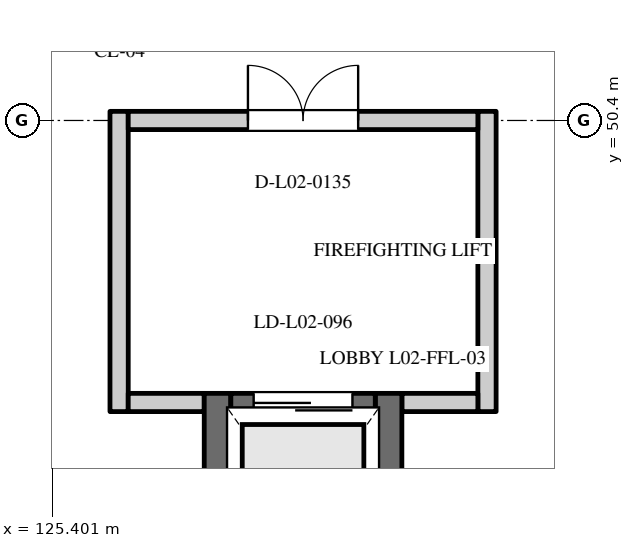
"""IFC4 building model, lengths in metres.
Left out: names, types, materials, properties, quantities, classifications, styles, units other than length and angle.
Written with IfcOpenShell. Run it as: python <this file> out.ifc"""

import sys

from ifc_helpers import new_model, si_unit, direction, frame, frame_2d, origin, place, context, subcontext, project, spatial, rectangle, extrude, element, fill, save


model = new_model("IFC4")
c1 = context("Model", 3, precision=1e-05, world=origin(), true_north=direction((0.0, 1.0)))
c2 = subcontext(c1, "Body", "Model", "MODEL_VIEW")
j1 = project(units=[si_unit("LENGTHUNIT", "METRE"), si_unit("PLANEANGLEUNIT", "RADIAN")], contexts=[c1])
p1 = place(None, origin())
s1 = spatial("IfcSite", under=j1, at=p1, CompositionType="ELEMENT")
p2 = place(p1, origin())
s2 = spatial("IfcBuilding", under=s1, at=p2, CompositionType="ELEMENT")
p3 = place(p2, frame((0.0, 0.0, 9.6)))
s3 = spatial("IfcBuildingStorey", under=s2, at=p3, CompositionType="ELEMENT", Elevation=9.6)
for number, where, z_axis, x_axis in (
    (1, (127.575, 43.06, 0.0), (0.0, 0.0, 1.0), (0.0, 1.0, 0.0)),
    (2, (129.825, 43.06, 0.0), (0.0, 0.0, 1.0), (0.0, 1.0, 0.0)),
):
    element("IfcWall", number, at=place(p3, frame(where, z_axis=z_axis, x_axis=x_axis)), inside=s3, PredefinedType="SHEAR", context=c2, shape_type="SweptSolid", body=[
        extrude(rectangle(XDim=3.75, YDim=0.35, at=frame_2d((1.875, 0.0))), origin(), (0.0, 0.0, 1.0), 4.8),
    ])
p4 = place(p3, frame((127.75, 46.635, 0.0), z_axis=(0.0, 0.0, 1.0), x_axis=(1.0, 0.0, 0.0)))
e3 = element("IfcWall", 3, at=p4, inside=s3, PredefinedType="SHEAR", context=c2, shape_type="SweptSolid", body=[
    extrude(rectangle(XDim=1.9, YDim=0.35, at=frame_2d((0.95, 0.0))), origin(), (0.0, 0.0, 1.0), 4.5),
])
p5 = place(p4, frame((0.3, 0.0, 0.0)))
e4 = element("IfcOpeningElement", 4, at=p5, cuts=e3, PredefinedType="OPENING", context=c2, shape_type="SweptSolid", body=[
    extrude(rectangle(XDim=1.3, YDim=2.2, at=frame_2d((0.65, 1.1))), frame((0.0, 0.187, 0.0), z_axis=(0.0, -1.0, 0.0), x_axis=(1.0, 0.0, 0.0)), (0.0, 0.0, 1.0), 0.374),
])
for number, where, z_axis, x_axis in (
    (5, (126.28, 46.57, 0.0), (0.0, 0.0, 1.0), (0.0, 1.0, 0.0)),
    (6, (131.12, 46.57, 0.0), (0.0, 0.0, 1.0), (0.0, 1.0, 0.0)),
):
    element("IfcWall", number, at=place(p3, frame(where, z_axis=z_axis, x_axis=x_axis)), inside=s3, PredefinedType="STANDARD", context=c2, shape_type="SweptSolid", body=[
        extrude(rectangle(XDim=3.95, YDim=0.24, at=frame_2d((1.975, 0.0))), origin(), (0.0, 0.0, 1.0), 3.75),
    ])
for number, where, z_axis, x_axis in (
    (7, (126.4, 46.69, 0.0), (0.0, 0.0, 1.0), (1.0, 0.0, 0.0)),
    (8, (130.0, 46.69, 0.0), (0.0, 0.0, 1.0), (1.0, 0.0, 0.0)),
):
    element("IfcWall", number, at=place(p3, frame(where, z_axis=z_axis, x_axis=x_axis)), inside=s3, PredefinedType="STANDARD", context=c2, shape_type="SweptSolid", body=[
        extrude(rectangle(XDim=1.0, YDim=0.24, at=frame_2d((0.5, 0.0))), origin(), (0.0, 0.0, 1.0), 3.75),
    ])
p6 = place(p3, frame((126.4, 50.4, 0.0), z_axis=(0.0, 0.0, 1.0), x_axis=(1.0, 0.0, 0.0)))
e9 = element("IfcWall", 9, at=p6, inside=s3, PredefinedType="STANDARD", context=c2, shape_type="SweptSolid", body=[
    extrude(rectangle(XDim=4.6, YDim=0.24, at=frame_2d((2.3, 0.0))), origin(), (0.0, 0.0, 1.0), 3.75),
])
p7 = place(p6, frame((1.575, 0.0, 0.0)))
e10 = element("IfcOpeningElement", 10, at=p7, cuts=e9, PredefinedType="OPENING", context=c2, shape_type="SweptSolid", body=[
    extrude(rectangle(XDim=1.45, YDim=2.2, at=frame_2d((0.725, 1.1))), frame((0.0, 0.132, 0.0), z_axis=(0.0, -1.0, 0.0), x_axis=(1.0, 0.0, 0.0)), (0.0, 0.0, 1.0), 0.264),
])
p8 = place(p5, origin())
e11 = element("IfcDoor", 11, at=p8, inside=s3, OperationType="SLIDING_TO_LEFT", PredefinedType="DOOR", context=c2, shape_type="SweptSolid", body=[
    extrude(rectangle(XDim=1.3, YDim=2.2, at=frame_2d((0.65, 1.1))), frame((0.0, 0.025, 0.0), z_axis=(0.0, -1.0, 0.0), x_axis=(1.0, 0.0, 0.0)), (0.0, 0.0, 1.0), 0.05),
])
fill(e4, e11)
p9 = place(p7, origin())
e12 = element("IfcDoor", 12, at=p9, inside=s3, OperationType="DOUBLE_DOOR_SINGLE_SWING", PredefinedType="DOOR", context=c2, shape_type="SweptSolid", body=[
    extrude(rectangle(XDim=1.45, YDim=2.2, at=frame_2d((0.725, 1.1))), frame((0.0, 0.025, 0.0), z_axis=(0.0, -1.0, 0.0), x_axis=(1.0, 0.0, 0.0)), (0.0, 0.0, 1.0), 0.05),
])
fill(e10, e12)
save(model, sys.argv[1])
